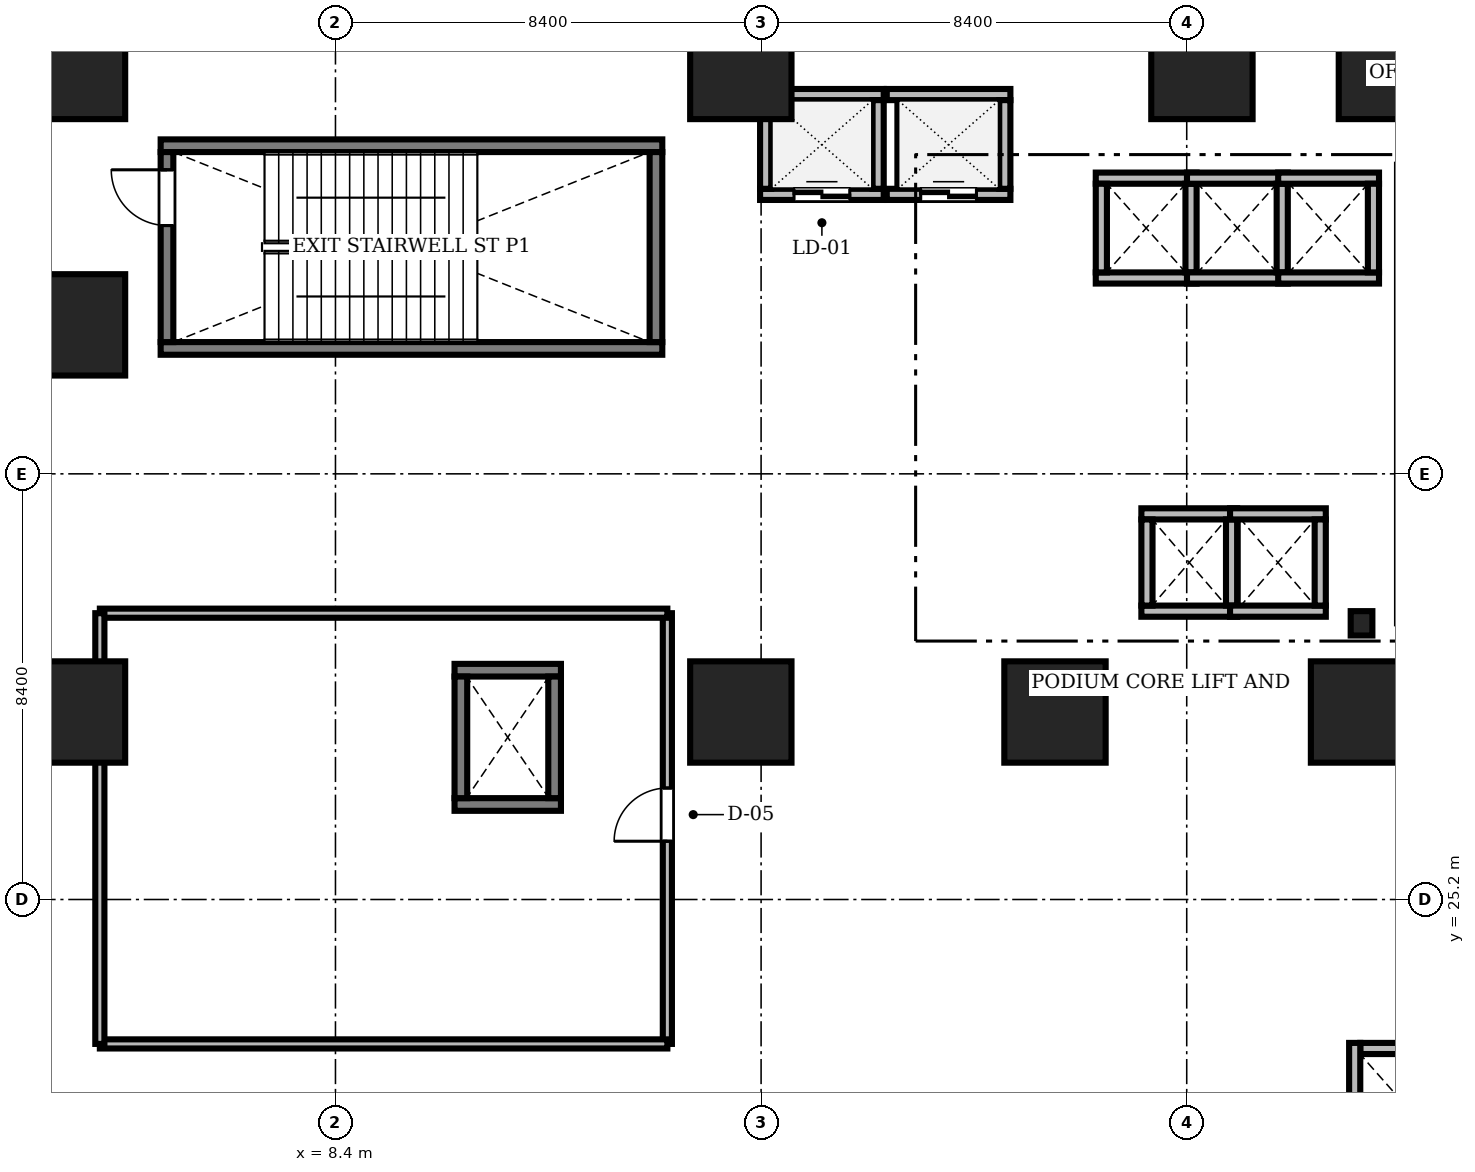
"""IFC4 building model, lengths in metres.
Left out: names, types, materials, properties, quantities, classifications, styles, units other than length and angle.
Written with IfcOpenShell. Run it as: python <this file> out.ifc"""

import sys

from ifc_helpers import new_model, si_unit, direction, frame, frame_2d, origin, origin_2d, place, context, subcontext, project, spatial, rectangle, i_section, extrude, source, transform, mapped, element, fill, save


model = new_model("IFC4")
c1 = context("Model", 3, precision=1e-05, world=origin(), true_north=direction((0.0, 1.0)))
c2 = subcontext(c1, "Body", "Model", "MODEL_VIEW")
j1 = project(units=[si_unit("LENGTHUNIT", "METRE"), si_unit("PLANEANGLEUNIT", "RADIAN")], contexts=[c1])
p1 = place(None, origin())
s1 = spatial("IfcSite", under=j1, at=p1, CompositionType="ELEMENT")
p2 = place(p1, origin())
s2 = spatial("IfcBuilding", under=s1, at=p2, CompositionType="ELEMENT")
p3 = place(p2, frame((0.0, 0.0, 11.4)))
s3 = spatial("IfcBuildingStorey", under=s2, at=p3, CompositionType="ELEMENT", Elevation=11.4)
m1 = source(origin(), c2, "Body", "SweptSolid", [
    extrude(i_section(OverallWidth=0.428, OverallDepth=0.481, WebThickness=0.04, FlangeThickness=0.063, FilletRadius=0.015, at=origin_2d()), origin(), (0.0, 0.0, 1.0), 5.2),
])
p4 = place(p3, frame((28.65, 30.65, 0.0), z_axis=(0.0, 0.0, 1.0), x_axis=(1.0, 0.0, 0.0)))
e1 = element("IfcColumn", 1, at=p4, inside=s3, PredefinedType="COLUMN", context=c2, shape_type="MappedRepresentation", body=[
    mapped(m1, transform((0.0, 0.0, 0.0), scale=1.0)),
])
m2 = source(origin(), c2, "Body", "SweptSolid", [
    extrude(rectangle(XDim=2.0, YDim=2.0, at=origin_2d()), origin(), (0.0, 0.0, 1.0), 5.2),
])
for number, where, z_axis, x_axis in (
    (2, (3.25, 28.9, 0.0), (0.0, 0.0, 1.0), (1.0, 0.0, 0.0)),
    (3, (16.4, 28.9, 0.0), (0.0, 0.0, 1.0), (1.0, 0.0, 0.0)),
    (4, (22.6, 28.9, 0.0), (0.0, 0.0, 1.0), (1.0, 0.0, 0.0)),
    (5, (28.65, 28.9, 0.0), (0.0, 0.0, 1.0), (1.0, 0.0, 0.0)),
    (6, (3.25, 36.54, 0.0), (0.0, 0.0, 1.0), (1.0, 0.0, 0.0)),
    (7, (3.25, 41.6, 0.0), (0.0, 0.0, 1.0), (1.0, 0.0, 0.0)),
    (8, (16.4, 41.6, 0.0), (0.0, 0.0, 1.0), (1.0, 0.0, 0.0)),
    (9, (25.5, 41.6, 0.0), (0.0, 0.0, 1.0), (1.0, 0.0, 0.0)),
    (10, (29.2, 41.6, 0.0), (0.0, 0.0, 1.0), (1.0, 0.0, 0.0)),
):
    element("IfcColumn", number, at=place(p3, frame(where, z_axis=z_axis, x_axis=x_axis)), inside=s3, PredefinedType="COLUMN", context=c2, shape_type="MappedRepresentation", body=[
        mapped(m2, transform((0.0, 0.0, 0.0), scale=1.0)),
    ])
m3 = source(origin(), c2, "Body", "SweptSolid", [
    extrude(rectangle(XDim=9.9, YDim=0.25, at=frame_2d((4.95, 0.0))), origin(), (0.0, 0.0, 1.0), 5.4),
])
for number, where, z_axis, x_axis in (
    (11, (4.95, 36.075, 0.0), (0.0, 0.0, 1.0), (1.0, 0.0, 0.0)),
    (12, (4.95, 40.075, 0.0), (0.0, 0.0, 1.0), (1.0, 0.0, 0.0)),
):
    element("IfcWall", number, at=place(p3, frame(where, z_axis=z_axis, x_axis=x_axis)), inside=s3, PredefinedType="SOLIDWALL", context=c2, shape_type="MappedRepresentation", body=[
        mapped(m3, transform((0.0, 0.0, 0.0), scale=1.0)),
    ])
m4 = source(origin(), c2, "Body", "SweptSolid", [
    extrude(rectangle(XDim=3.75, YDim=0.25, at=frame_2d((1.875, 0.0))), origin(), (0.0, 0.0, 1.0), 5.4),
])
p5 = place(p3, frame((14.725, 36.2, 0.0), z_axis=(0.0, 0.0, 1.0), x_axis=(0.0, 1.0, 0.0)))
e13 = element("IfcWall", 13, at=p5, inside=s3, PredefinedType="SOLIDWALL", context=c2, shape_type="MappedRepresentation", body=[
    mapped(m4, transform((0.0, 0.0, 0.0), scale=1.0)),
])
p6 = place(p3, frame((5.075, 36.2, 0.0), z_axis=(0.0, 0.0, 1.0), x_axis=(0.0, 1.0, 0.0)))
e14 = element("IfcWall", 14, at=p6, inside=s3, PredefinedType="SOLIDWALL", context=c2, shape_type="MappedRepresentation", body=[
    mapped(m4, transform((0.0, 0.0, 0.0), scale=1.0)),
])
m5 = source(origin(), c2, "Body", "SweptSolid", [
    extrude(rectangle(XDim=1.1, YDim=2.2, at=frame_2d((0.55, 1.1))), frame((0.0, 0.135, 0.0), z_axis=(0.0, -1.0, 0.0), x_axis=(1.0, 0.0, 0.0)), (0.0, 0.0, 1.0), 0.27),
])
p7 = place(p6, frame((2.3, 0.0, 0.0)))
e15 = element("IfcOpeningElement", 15, at=p7, cuts=e14, PredefinedType="OPENING", context=c2, shape_type="MappedRepresentation", body=[
    mapped(m5, transform((0.0, 0.0, 0.0), scale=1.0)),
])
m6 = source(origin(), c2, "Body", "SweptSolid", [
    extrude(rectangle(XDim=2.1, YDim=0.25, at=frame_2d((1.05, 0.0))), origin(), (0.0, 0.0, 1.0), 5.2),
])
for number, where, z_axis, x_axis in (
    (16, (10.75, 27.075, 0.0), (0.0, 0.0, 1.0), (1.0, 0.0, 0.0)),
    (17, (10.75, 29.725, 0.0), (0.0, 0.0, 1.0), (1.0, 0.0, 0.0)),
):
    element("IfcWall", number, at=place(p3, frame(where, z_axis=z_axis, x_axis=x_axis)), inside=s3, PredefinedType="SOLIDWALL", context=c2, shape_type="MappedRepresentation", body=[
        mapped(m6, transform((0.0, 0.0, 0.0), scale=1.0)),
    ])
m7 = source(origin(), c2, "Body", "SweptSolid", [
    extrude(rectangle(XDim=2.4, YDim=0.25, at=frame_2d((1.2, 0.0))), origin(), (0.0, 0.0, 1.0), 5.2),
])
for number, where, z_axis, x_axis in (
    (18, (10.875, 27.2, 0.0), (0.0, 0.0, 1.0), (0.0, 1.0, 0.0)),
    (19, (12.725, 27.2, 0.0), (0.0, 0.0, 1.0), (0.0, 1.0, 0.0)),
):
    element("IfcWall", number, at=place(p3, frame(where, z_axis=z_axis, x_axis=x_axis)), inside=s3, PredefinedType="SOLIDWALL", context=c2, shape_type="MappedRepresentation", body=[
        mapped(m7, transform((0.0, 0.0, 0.0), scale=1.0)),
    ])
m8 = source(origin(), c2, "Body", "SweptSolid", [
    extrude(rectangle(XDim=2.44, YDim=0.22, at=frame_2d((1.22, 0.0))), origin(), (0.0, 0.0, 1.0), 3.392),
])
p8 = place(p3, frame((16.78, 39.115, 0.0), z_axis=(0.0, 0.0, 1.0), x_axis=(1.0, 0.0, 0.0)))
e20 = element("IfcWall", 20, at=p8, inside=s3, PredefinedType="SOLIDWALL", context=c2, shape_type="MappedRepresentation", body=[
    mapped(m8, transform((0.0, 0.0, 0.0), scale=1.0)),
])
m9 = source(origin(), c2, "Body", "SweptSolid", [
    extrude(rectangle(XDim=1.1, YDim=2.2, at=frame_2d((0.55, 1.1))), frame((0.0, 0.12, 0.0), z_axis=(0.0, -1.0, 0.0), x_axis=(1.0, 0.0, 0.0)), (0.0, 0.0, 1.0), 0.24),
])
p9 = place(p8, frame((0.67, 0.0, 0.0)))
e21 = element("IfcOpeningElement", 21, at=p9, cuts=e20, PredefinedType="OPENING", context=c2, shape_type="MappedRepresentation", body=[
    mapped(m9, transform((0.0, 0.0, 0.0), scale=1.0)),
])
p10 = place(p3, frame((16.78, 41.085, 0.0), z_axis=(0.0, 0.0, 1.0), x_axis=(1.0, 0.0, 0.0)))
e22 = element("IfcWall", 22, at=p10, inside=s3, PredefinedType="SOLIDWALL", context=c2, shape_type="MappedRepresentation", body=[
    mapped(m8, transform((0.0, 0.0, 0.0), scale=1.0)),
])
m10 = source(origin(), c2, "Body", "SweptSolid", [
    extrude(rectangle(XDim=1.75, YDim=0.22, at=frame_2d((0.875, 0.0))), origin(), (0.0, 0.0, 1.0), 3.392),
])
p11 = place(p3, frame((16.89, 39.225, 0.0), z_axis=(0.0, 0.0, 1.0), x_axis=(0.0, 1.0, 0.0)))
e23 = element("IfcWall", 23, at=p11, inside=s3, PredefinedType="SOLIDWALL", context=c2, shape_type="MappedRepresentation", body=[
    mapped(m10, transform((0.0, 0.0, 0.0), scale=1.0)),
])
m11 = source(origin(), c2, "Body", "SweptSolid", [
    extrude(rectangle(XDim=1.75, YDim=0.22, at=frame_2d((0.875, 0.0))), origin(), (0.0, 0.0, 1.0), 5.2),
])
p12 = place(p3, frame((19.11, 39.225, 0.0), z_axis=(0.0, 0.0, 1.0), x_axis=(0.0, 1.0, 0.0)))
e24 = element("IfcWall", 24, at=p12, inside=s3, PredefinedType="SOLIDWALL", context=c2, shape_type="MappedRepresentation", body=[
    mapped(m11, transform((0.0, 0.0, 0.0), scale=1.0)),
])
m12 = source(origin(), c2, "Body", "SweptSolid", [
    extrude(rectangle(XDim=2.44, YDim=0.22, at=frame_2d((1.22, 0.0))), origin(), (0.0, 0.0, 1.0), 5.2),
])
p13 = place(p3, frame((19.28, 39.115, 0.0), z_axis=(0.0, 0.0, 1.0), x_axis=(1.0, 0.0, 0.0)))
e25 = element("IfcWall", 25, at=p13, inside=s3, PredefinedType="SOLIDWALL", context=c2, shape_type="MappedRepresentation", body=[
    mapped(m12, transform((0.0, 0.0, 0.0), scale=1.0)),
])
p14 = place(p13, frame((0.67, 0.0, 0.0)))
e26 = element("IfcOpeningElement", 26, at=p14, cuts=e25, PredefinedType="OPENING", context=c2, shape_type="MappedRepresentation", body=[
    mapped(m9, transform((0.0, 0.0, 0.0), scale=1.0)),
])
p15 = place(p3, frame((19.28, 41.085, 0.0), z_axis=(0.0, 0.0, 1.0), x_axis=(1.0, 0.0, 0.0)))
e27 = element("IfcWall", 27, at=p15, inside=s3, PredefinedType="SOLIDWALL", context=c2, shape_type="MappedRepresentation", body=[
    mapped(m8, transform((0.0, 0.0, 0.0), scale=1.0)),
])
p16 = place(p3, frame((21.61, 39.225, 0.0), z_axis=(0.0, 0.0, 1.0), x_axis=(0.0, 1.0, 0.0)))
e28 = element("IfcWall", 28, at=p16, inside=s3, PredefinedType="SOLIDWALL", context=c2, shape_type="MappedRepresentation", body=[
    mapped(m11, transform((0.0, 0.0, 0.0), scale=1.0)),
])
m13 = source(origin(), c2, "Body", "SweptSolid", [
    extrude(rectangle(XDim=1.99, YDim=0.22, at=frame_2d((0.995, 0.0))), origin(), (0.0, 0.0, 1.0), 5.2),
])
for number, where, z_axis, x_axis in (
    (29, (23.405, 37.465, 0.0), (0.0, 0.0, 1.0), (1.0, 0.0, 0.0)),
    (30, (23.405, 39.435, 0.0), (0.0, 0.0, 1.0), (1.0, 0.0, 0.0)),
):
    element("IfcWall", number, at=place(p3, frame(where, z_axis=z_axis, x_axis=x_axis)), inside=s3, PredefinedType="SOLIDWALL", context=c2, shape_type="MappedRepresentation", body=[
        mapped(m13, transform((0.0, 0.0, 0.0), scale=1.0)),
    ])
for number, where, z_axis, x_axis in (
    (31, (23.515, 37.575, 0.0), (0.0, 0.0, 1.0), (0.0, 1.0, 0.0)),
    (32, (25.285, 37.575, 0.0), (0.0, 0.0, 1.0), (0.0, 1.0, 0.0)),
):
    element("IfcWall", number, at=place(p3, frame(where, z_axis=z_axis, x_axis=x_axis)), inside=s3, PredefinedType="SOLIDWALL", context=c2, shape_type="MappedRepresentation", body=[
        mapped(m11, transform((0.0, 0.0, 0.0), scale=1.0)),
    ])
for number, where, z_axis, x_axis in (
    (33, (25.205, 37.465, 0.0), (0.0, 0.0, 1.0), (1.0, 0.0, 0.0)),
    (34, (25.205, 39.435, 0.0), (0.0, 0.0, 1.0), (1.0, 0.0, 0.0)),
):
    element("IfcWall", number, at=place(p3, frame(where, z_axis=z_axis, x_axis=x_axis)), inside=s3, PredefinedType="SOLIDWALL", context=c2, shape_type="MappedRepresentation", body=[
        mapped(m13, transform((0.0, 0.0, 0.0), scale=1.0)),
    ])
p17 = place(p3, frame((27.085, 37.575, 0.0), z_axis=(0.0, 0.0, 1.0), x_axis=(0.0, 1.0, 0.0)))
e35 = element("IfcWall", 35, at=p17, inside=s3, PredefinedType="SOLIDWALL", context=c2, shape_type="MappedRepresentation", body=[
    mapped(m11, transform((0.0, 0.0, 0.0), scale=1.0)),
])
m14 = source(origin(), c2, "Body", "SweptSolid", [
    extrude(rectangle(XDim=1.99, YDim=0.22, at=frame_2d((0.995, 0.0))), origin(), (0.0, 0.0, 1.0), 5.2),
])
for number, where, z_axis, x_axis in (
    (36, (27.005, 37.465, 0.0), (0.0, 0.0, 1.0), (1.0, 0.0, 0.0)),
    (37, (27.005, 39.435, 0.0), (0.0, 0.0, 1.0), (1.0, 0.0, 0.0)),
):
    element("IfcWall", number, at=place(p3, frame(where, z_axis=z_axis, x_axis=x_axis)), inside=s3, PredefinedType="SOLIDWALL", context=c2, shape_type="MappedRepresentation", body=[
        mapped(m14, transform((0.0, 0.0, 0.0), scale=1.0)),
    ])
p18 = place(p3, frame((28.885, 37.575, 0.0), z_axis=(0.0, 0.0, 1.0), x_axis=(0.0, 1.0, 0.0)))
e38 = element("IfcWall", 38, at=p18, inside=s3, PredefinedType="SOLIDWALL", context=c2, shape_type="MappedRepresentation", body=[
    mapped(m11, transform((0.0, 0.0, 0.0), scale=1.0)),
])
m15 = source(origin(), c2, "Body", "SweptSolid", [
    extrude(rectangle(XDim=1.89, YDim=0.22, at=frame_2d((0.945, 0.0))), origin(), (0.0, 0.0, 1.0), 5.2),
])
for number, where, z_axis, x_axis in (
    (39, (24.305, 30.89, 0.0), (0.0, 0.0, 1.0), (1.0, 0.0, 0.0)),
    (40, (24.305, 32.81, 0.0), (0.0, 0.0, 1.0), (1.0, 0.0, 0.0)),
):
    element("IfcWall", number, at=place(p3, frame(where, z_axis=z_axis, x_axis=x_axis)), inside=s3, PredefinedType="SOLIDWALL", context=c2, shape_type="MappedRepresentation", body=[
        mapped(m15, transform((0.0, 0.0, 0.0), scale=1.0)),
    ])
m16 = source(origin(), c2, "Body", "SweptSolid", [
    extrude(rectangle(XDim=1.7, YDim=0.22, at=frame_2d((0.85, 0.0))), origin(), (0.0, 0.0, 1.0), 5.2),
])
for number, where, z_axis, x_axis in (
    (41, (24.415, 31.0, 0.0), (0.0, 0.0, 1.0), (0.0, 1.0, 0.0)),
    (42, (26.085, 31.0, 0.0), (0.0, 0.0, 1.0), (0.0, 1.0, 0.0)),
):
    element("IfcWall", number, at=place(p3, frame(where, z_axis=z_axis, x_axis=x_axis)), inside=s3, PredefinedType="SOLIDWALL", context=c2, shape_type="MappedRepresentation", body=[
        mapped(m16, transform((0.0, 0.0, 0.0), scale=1.0)),
    ])
for number, where, z_axis, x_axis in (
    (43, (26.055, 30.89, 0.0), (0.0, 0.0, 1.0), (1.0, 0.0, 0.0)),
    (44, (26.055, 32.81, 0.0), (0.0, 0.0, 1.0), (1.0, 0.0, 0.0)),
):
    element("IfcWall", number, at=place(p3, frame(where, z_axis=z_axis, x_axis=x_axis)), inside=s3, PredefinedType="SOLIDWALL", context=c2, shape_type="MappedRepresentation", body=[
        mapped(m15, transform((0.0, 0.0, 0.0), scale=1.0)),
    ])
p19 = place(p3, frame((27.835, 31.0, 0.0), z_axis=(0.0, 0.0, 1.0), x_axis=(0.0, 1.0, 0.0)))
e45 = element("IfcWall", 45, at=p19, inside=s3, PredefinedType="SOLIDWALL", context=c2, shape_type="MappedRepresentation", body=[
    mapped(m16, transform((0.0, 0.0, 0.0), scale=1.0)),
])
m17 = source(origin(), c2, "Body", "SweptSolid", [
    extrude(rectangle(XDim=1.85, YDim=0.22, at=frame_2d((0.925, 0.0))), origin(), (0.0, 0.0, 1.0), 5.2),
])
p20 = place(p3, frame((28.625, 22.26, 0.0), z_axis=(0.0, 0.0, 1.0), x_axis=(1.0, 0.0, 0.0)))
e46 = element("IfcWall", 46, at=p20, inside=s3, PredefinedType="SOLIDWALL", context=c2, shape_type="MappedRepresentation", body=[
    mapped(m17, transform((0.0, 0.0, 0.0), scale=1.0)),
])
m18 = source(origin(), c2, "Body", "SweptSolid", [
    extrude(rectangle(XDim=2.54, YDim=0.22, at=frame_2d((1.27, 0.0))), origin(), (0.0, 0.0, 1.0), 5.2),
])
p21 = place(p3, frame((28.515, 19.83, 0.0), z_axis=(0.0, 0.0, 1.0), x_axis=(0.0, 1.0, 0.0)))
e47 = element("IfcWall", 47, at=p21, inside=s3, PredefinedType="SOLIDWALL", context=c2, shape_type="MappedRepresentation", body=[
    mapped(m18, transform((0.0, 0.0, 0.0), scale=1.0)),
])
m19 = source(origin(), c2, "Body", "SweptSolid", [
    extrude(rectangle(XDim=8.5, YDim=0.18, at=frame_2d((4.25, 0.0))), origin(), (0.0, 0.0, 1.0), 3.392),
])
p22 = place(p3, frame((14.95, 22.35, 0.0), z_axis=(0.0, 0.0, 1.0), x_axis=(0.0, 1.0, 0.0)))
e48 = element("IfcWall", 48, at=p22, inside=s3, PredefinedType="PARTITIONING", context=c2, shape_type="MappedRepresentation", body=[
    mapped(m19, transform((0.0, 0.0, 0.0), scale=1.0)),
])
m20 = source(origin(), c2, "Body", "SweptSolid", [
    extrude(rectangle(XDim=1.05, YDim=2.2, at=frame_2d((0.525, 1.1))), frame((0.0, 0.1, 0.0), z_axis=(0.0, -1.0, 0.0), x_axis=(1.0, 0.0, 0.0)), (0.0, 0.0, 1.0), 0.2),
])
p23 = place(p22, frame((4.0, 0.0, 0.0)))
e49 = element("IfcOpeningElement", 49, at=p23, cuts=e48, PredefinedType="OPENING", context=c2, shape_type="MappedRepresentation", body=[
    mapped(m20, transform((0.0, 0.0, 0.0), scale=1.0)),
])
m21 = source(origin(), c2, "Body", "SweptSolid", [
    extrude(rectangle(XDim=11.2, YDim=0.18, at=frame_2d((5.6, 0.0))), origin(), (0.0, 0.0, 1.0), 3.392),
])
for number, where, z_axis, x_axis in (
    (50, (3.75, 22.35, 0.0), (0.0, 0.0, 1.0), (1.0, 0.0, 0.0)),
    (51, (3.75, 30.85, 0.0), (0.0, 0.0, 1.0), (1.0, 0.0, 0.0)),
):
    element("IfcWall", number, at=place(p3, frame(where, z_axis=z_axis, x_axis=x_axis)), inside=s3, PredefinedType="PARTITIONING", context=c2, shape_type="MappedRepresentation", body=[
        mapped(m21, transform((0.0, 0.0, 0.0), scale=1.0)),
    ])
p24 = place(p3, frame((3.75, 22.35, 0.0), z_axis=(0.0, 0.0, 1.0), x_axis=(0.0, 1.0, 0.0)))
e52 = element("IfcWall", 52, at=p24, inside=s3, PredefinedType="PARTITIONING", context=c2, shape_type="MappedRepresentation", body=[
    mapped(m19, transform((0.0, 0.0, 0.0), scale=1.0)),
])
m22 = source(origin(), c2, "Body", "SweptSolid", [
    extrude(rectangle(XDim=1.1, YDim=2.2, at=frame_2d((0.55, 1.1))), frame((0.0, 0.025, 0.0), z_axis=(0.0, -1.0, 0.0), x_axis=(1.0, 0.0, 0.0)), (0.0, 0.0, 1.0), 0.05),
])
p25 = place(p7, origin())
e53 = element("IfcDoor", 53, at=p25, inside=s3, OperationType="SINGLE_SWING_RIGHT", PredefinedType="DOOR", context=c2, shape_type="MappedRepresentation", body=[
    mapped(m22, transform((0.0, 0.0, 0.0), scale=1.0)),
])
fill(e15, e53)
p26 = place(p9, origin())
e54 = element("IfcDoor", 54, at=p26, inside=s3, OperationType="DOUBLE_DOOR_SLIDING", PredefinedType="DOOR", context=c2, shape_type="MappedRepresentation", body=[
    mapped(m22, transform((0.0, 0.0, 0.0), scale=1.0)),
])
fill(e21, e54)
p27 = place(p14, origin())
e55 = element("IfcDoor", 55, at=p27, inside=s3, OperationType="DOUBLE_DOOR_SLIDING", PredefinedType="DOOR", context=c2, shape_type="MappedRepresentation", body=[
    mapped(m22, transform((0.0, 0.0, 0.0), scale=1.0)),
])
fill(e26, e55)
m23 = source(origin(), c2, "Body", "SweptSolid", [
    extrude(rectangle(XDim=1.05, YDim=2.2, at=frame_2d((0.525, 1.1))), frame((0.0, 0.025, 0.0), z_axis=(0.0, -1.0, 0.0), x_axis=(1.0, 0.0, 0.0)), (0.0, 0.0, 1.0), 0.05),
])
p28 = place(p23, origin())
e56 = element("IfcDoor", 56, at=p28, inside=s3, OperationType="SINGLE_SWING_LEFT", PredefinedType="DOOR", context=c2, shape_type="MappedRepresentation", body=[
    mapped(m23, transform((0.0, 0.0, 0.0), scale=1.0)),
])
fill(e49, e56)
save(model, sys.argv[1])
